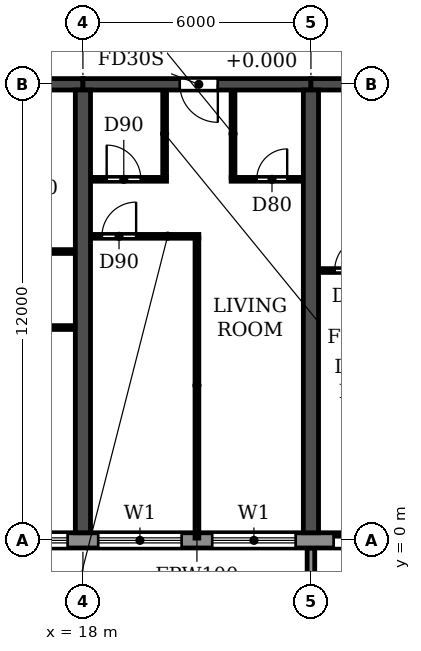
"""IFC4 building model, lengths in metres.
Left out: names, types, materials, properties, quantities, classifications, styles, units other than length and angle.
Written with IfcOpenShell. Run it as: python <this file> out.ifc"""

import sys

from ifc_helpers import new_model, si_unit, direction, frame, frame_2d, origin, place, context, subcontext, project, spatial, polyline, rectangle, outline, extrude, source, transform, mapped, element, fill, save


model = new_model("IFC4")
c1 = context("Model", 3, precision=1e-05, world=origin(), true_north=direction((0.0, 1.0)))
c2 = subcontext(c1, "Body", "Model", "MODEL_VIEW")
j1 = project(units=[si_unit("LENGTHUNIT", "METRE"), si_unit("PLANEANGLEUNIT", "RADIAN")], contexts=[c1])
p1 = place(None, origin())
s1 = spatial("IfcSite", under=j1, at=p1, CompositionType="ELEMENT")
p2 = place(p1, origin())
s2 = spatial("IfcBuilding", under=s1, at=p2, CompositionType="ELEMENT")
p3 = place(p2, frame((0.0, 0.0, 26.7)))
s3 = spatial("IfcBuildingStorey", under=s2, at=p3, CompositionType="ELEMENT", Elevation=26.7)
for number, where, z_axis, x_axis in (
    (1, (18.0, 0.2, 0.0), (0.0, 0.0, 1.0), (0.0, 1.0, 0.0)),
    (2, (24.0, 0.2, 0.0), (0.0, 0.0, 1.0), (0.0, 1.0, 0.0)),
):
    element("IfcWall", number, at=place(p3, frame(where, z_axis=z_axis, x_axis=x_axis)), inside=s3, PredefinedType="SHEAR", context=c2, shape_type="SweptSolid", body=[
        extrude(rectangle(XDim=11.65, YDim=0.4, at=frame_2d((5.825, 0.0))), origin(), (0.0, 0.0, 1.0), 3.05),
    ])
p4 = place(p3, frame((12.0, 12.0, 0.0), z_axis=(0.0, 0.0, 1.0), x_axis=(1.0, 0.0, 0.0)))
e3 = element("IfcWall", 3, at=p4, inside=s3, PredefinedType="SHEAR", context=c2, shape_type="SweptSolid", body=[
    extrude(rectangle(XDim=6.0, YDim=0.3, at=frame_2d((3.0, 0.0))), origin(), (0.0, 0.0, 1.0), 2.45),
])
p5 = place(p3, frame((18.0, 12.0, 0.0), z_axis=(0.0, 0.0, 1.0), x_axis=(1.0, 0.0, 0.0)))
e4 = element("IfcWall", 4, at=p5, inside=s3, PredefinedType="SHEAR", context=c2, shape_type="SweptSolid", body=[
    extrude(rectangle(XDim=6.0, YDim=0.3, at=frame_2d((3.0, 0.0))), origin(), (0.0, 0.0, 1.0), 2.45),
])
p6 = place(p5, frame((2.55, 0.0, 0.0)))
e5 = element("IfcOpeningElement", 5, at=p6, cuts=e4, PredefinedType="OPENING", context=c2, shape_type="SweptSolid", body=[
    extrude(rectangle(XDim=1.0, YDim=2.1, at=frame_2d((0.5, 1.05))), frame((0.0, 0.16, 0.0), z_axis=(0.0, -1.0, 0.0), x_axis=(1.0, 0.0, 0.0)), (0.0, 0.0, 1.0), 0.32),
])
p7 = place(p3, frame((24.0, 12.0, 0.0), z_axis=(0.0, 0.0, 1.0), x_axis=(1.0, 0.0, 0.0)))
e6 = element("IfcWall", 6, at=p7, inside=s3, PredefinedType="SHEAR", context=c2, shape_type="SweptSolid", body=[
    extrude(rectangle(XDim=6.0, YDim=0.3, at=frame_2d((3.0, 0.0))), origin(), (0.0, 0.0, 1.0), 2.45),
])
p8 = place(p7, frame((2.55, 0.0, 0.0)))
e7 = element("IfcOpeningElement", 7, at=p8, cuts=e6, PredefinedType="OPENING", context=c2, shape_type="SweptSolid", body=[
    extrude(rectangle(XDim=1.0, YDim=2.1, at=frame_2d((0.5, 1.05))), frame((0.0, 0.16, 0.0), z_axis=(0.0, -1.0, 0.0), x_axis=(1.0, 0.0, 0.0)), (0.0, 0.0, 1.0), 0.32),
])
p9 = place(p3, frame((4.683, 0.0, 0.0), z_axis=(0.0, 0.0, 1.0), x_axis=(1.0, 0.0, 0.0)))
e8 = element("IfcWall", 8, at=p9, inside=s3, PredefinedType="STANDARD", context=c2, shape_type="SweptSolid", body=[
    extrude(rectangle(XDim=92.634, YDim=0.4, at=frame_2d((46.317, 0.0))), origin(), (0.0, 0.0, 1.0), 3.05),
])
p10 = place(p9, frame((1.717, 0.0, 0.9)))
e9 = element("IfcOpeningElement", 9, at=p10, cuts=e8, PredefinedType="OPENING", context=c2, shape_type="SweptSolid", body=[
    extrude(rectangle(XDim=2.2, YDim=1.5, at=frame_2d((1.1, 0.75))), frame((0.0, 0.21, 0.0), z_axis=(0.0, -1.0, 0.0), x_axis=(1.0, 0.0, 0.0)), (0.0, 0.0, 1.0), 0.42),
])
p11 = place(p9, frame((4.717, 0.0, 0.9)))
e10 = element("IfcOpeningElement", 10, at=p11, cuts=e8, PredefinedType="OPENING", context=c2, shape_type="SweptSolid", body=[
    extrude(rectangle(XDim=2.2, YDim=1.5, at=frame_2d((1.1, 0.75))), frame((0.0, 0.21, 0.0), z_axis=(0.0, -1.0, 0.0), x_axis=(1.0, 0.0, 0.0)), (0.0, 0.0, 1.0), 0.42),
])
p12 = place(p9, frame((7.717, 0.0, 0.9)))
e11 = element("IfcOpeningElement", 11, at=p12, cuts=e8, PredefinedType="OPENING", context=c2, shape_type="SweptSolid", body=[
    extrude(rectangle(XDim=2.2, YDim=1.5, at=frame_2d((1.1, 0.75))), frame((0.0, 0.21, 0.0), z_axis=(0.0, -1.0, 0.0), x_axis=(1.0, 0.0, 0.0)), (0.0, 0.0, 1.0), 0.42),
])
p13 = place(p9, frame((10.717, 0.0, 0.9)))
e12 = element("IfcOpeningElement", 12, at=p13, cuts=e8, PredefinedType="OPENING", context=c2, shape_type="SweptSolid", body=[
    extrude(rectangle(XDim=2.2, YDim=1.5, at=frame_2d((1.1, 0.75))), frame((0.0, 0.21, 0.0), z_axis=(0.0, -1.0, 0.0), x_axis=(1.0, 0.0, 0.0)), (0.0, 0.0, 1.0), 0.42),
])
p14 = place(p9, frame((13.717, 0.0, 0.9)))
e13 = element("IfcOpeningElement", 13, at=p14, cuts=e8, PredefinedType="OPENING", context=c2, shape_type="SweptSolid", body=[
    extrude(rectangle(XDim=2.2, YDim=1.5, at=frame_2d((1.1, 0.75))), frame((0.0, 0.21, 0.0), z_axis=(0.0, -1.0, 0.0), x_axis=(1.0, 0.0, 0.0)), (0.0, 0.0, 1.0), 0.42),
])
p15 = place(p9, frame((16.717, 0.0, 0.9)))
e14 = element("IfcOpeningElement", 14, at=p15, cuts=e8, PredefinedType="OPENING", context=c2, shape_type="SweptSolid", body=[
    extrude(rectangle(XDim=2.2, YDim=1.5, at=frame_2d((1.1, 0.75))), frame((0.0, 0.21, 0.0), z_axis=(0.0, -1.0, 0.0), x_axis=(1.0, 0.0, 0.0)), (0.0, 0.0, 1.0), 0.42),
])
p16 = place(p9, frame((19.917, 0.0, 0.0)))
e15 = element("IfcOpeningElement", 15, at=p16, cuts=e8, PredefinedType="OPENING", context=c2, shape_type="SweptSolid", body=[
    extrude(rectangle(XDim=1.8, YDim=2.4, at=frame_2d((0.9, 1.2))), frame((0.0, 0.21, 0.0), z_axis=(0.0, -1.0, 0.0), x_axis=(1.0, 0.0, 0.0)), (0.0, 0.0, 1.0), 0.42),
])
p17 = place(p9, frame((22.717, 0.0, 0.9)))
e16 = element("IfcOpeningElement", 16, at=p17, cuts=e8, PredefinedType="OPENING", context=c2, shape_type="SweptSolid", body=[
    extrude(rectangle(XDim=2.2, YDim=1.5, at=frame_2d((1.1, 0.75))), frame((0.0, 0.21, 0.0), z_axis=(0.0, -1.0, 0.0), x_axis=(1.0, 0.0, 0.0)), (0.0, 0.0, 1.0), 0.42),
])
p18 = place(p9, frame((25.717, 0.0, 0.9)))
e17 = element("IfcOpeningElement", 17, at=p18, cuts=e8, PredefinedType="OPENING", context=c2, shape_type="SweptSolid", body=[
    extrude(rectangle(XDim=2.2, YDim=1.5, at=frame_2d((1.1, 0.75))), frame((0.0, 0.21, 0.0), z_axis=(0.0, -1.0, 0.0), x_axis=(1.0, 0.0, 0.0)), (0.0, 0.0, 1.0), 0.42),
])
p19 = place(p9, frame((28.717, 0.0, 0.9)))
e18 = element("IfcOpeningElement", 18, at=p19, cuts=e8, PredefinedType="OPENING", context=c2, shape_type="SweptSolid", body=[
    extrude(rectangle(XDim=2.2, YDim=1.5, at=frame_2d((1.1, 0.75))), frame((0.0, 0.21, 0.0), z_axis=(0.0, -1.0, 0.0), x_axis=(1.0, 0.0, 0.0)), (0.0, 0.0, 1.0), 0.42),
])
p20 = place(p9, frame((31.917, 0.0, 0.0)))
e19 = element("IfcOpeningElement", 19, at=p20, cuts=e8, PredefinedType="OPENING", context=c2, shape_type="SweptSolid", body=[
    extrude(rectangle(XDim=1.8, YDim=2.4, at=frame_2d((0.9, 1.2))), frame((0.0, 0.21, 0.0), z_axis=(0.0, -1.0, 0.0), x_axis=(1.0, 0.0, 0.0)), (0.0, 0.0, 1.0), 0.42),
])
p21 = place(p9, frame((34.717, 0.0, 0.9)))
e20 = element("IfcOpeningElement", 20, at=p21, cuts=e8, PredefinedType="OPENING", context=c2, shape_type="SweptSolid", body=[
    extrude(rectangle(XDim=2.2, YDim=1.5, at=frame_2d((1.1, 0.75))), frame((0.0, 0.21, 0.0), z_axis=(0.0, -1.0, 0.0), x_axis=(1.0, 0.0, 0.0)), (0.0, 0.0, 1.0), 0.42),
])
p22 = place(p9, frame((37.717, 0.0, 0.9)))
e21 = element("IfcOpeningElement", 21, at=p22, cuts=e8, PredefinedType="OPENING", context=c2, shape_type="SweptSolid", body=[
    extrude(rectangle(XDim=2.2, YDim=1.5, at=frame_2d((1.1, 0.75))), frame((0.0, 0.21, 0.0), z_axis=(0.0, -1.0, 0.0), x_axis=(1.0, 0.0, 0.0)), (0.0, 0.0, 1.0), 0.42),
])
p23 = place(p9, frame((40.717, 0.0, 0.9)))
e22 = element("IfcOpeningElement", 22, at=p23, cuts=e8, PredefinedType="OPENING", context=c2, shape_type="SweptSolid", body=[
    extrude(rectangle(XDim=2.2, YDim=1.5, at=frame_2d((1.1, 0.75))), frame((0.0, 0.21, 0.0), z_axis=(0.0, -1.0, 0.0), x_axis=(1.0, 0.0, 0.0)), (0.0, 0.0, 1.0), 0.42),
])
p24 = place(p9, frame((43.917, 0.0, 0.0)))
e23 = element("IfcOpeningElement", 23, at=p24, cuts=e8, PredefinedType="OPENING", context=c2, shape_type="SweptSolid", body=[
    extrude(rectangle(XDim=1.8, YDim=2.4, at=frame_2d((0.9, 1.2))), frame((0.0, 0.21, 0.0), z_axis=(0.0, -1.0, 0.0), x_axis=(1.0, 0.0, 0.0)), (0.0, 0.0, 1.0), 0.42),
])
p25 = place(p9, frame((46.717, 0.0, 0.9)))
e24 = element("IfcOpeningElement", 24, at=p25, cuts=e8, PredefinedType="OPENING", context=c2, shape_type="SweptSolid", body=[
    extrude(rectangle(XDim=2.2, YDim=1.5, at=frame_2d((1.1, 0.75))), frame((0.0, 0.21, 0.0), z_axis=(0.0, -1.0, 0.0), x_axis=(1.0, 0.0, 0.0)), (0.0, 0.0, 1.0), 0.42),
])
p26 = place(p9, frame((49.717, 0.0, 0.9)))
e25 = element("IfcOpeningElement", 25, at=p26, cuts=e8, PredefinedType="OPENING", context=c2, shape_type="SweptSolid", body=[
    extrude(rectangle(XDim=2.2, YDim=1.5, at=frame_2d((1.1, 0.75))), frame((0.0, 0.21, 0.0), z_axis=(0.0, -1.0, 0.0), x_axis=(1.0, 0.0, 0.0)), (0.0, 0.0, 1.0), 0.42),
])
p27 = place(p9, frame((52.717, 0.0, 0.9)))
e26 = element("IfcOpeningElement", 26, at=p27, cuts=e8, PredefinedType="OPENING", context=c2, shape_type="SweptSolid", body=[
    extrude(rectangle(XDim=2.2, YDim=1.5, at=frame_2d((1.1, 0.75))), frame((0.0, 0.21, 0.0), z_axis=(0.0, -1.0, 0.0), x_axis=(1.0, 0.0, 0.0)), (0.0, 0.0, 1.0), 0.42),
])
p28 = place(p9, frame((55.717, 0.0, 0.9)))
e27 = element("IfcOpeningElement", 27, at=p28, cuts=e8, PredefinedType="OPENING", context=c2, shape_type="SweptSolid", body=[
    extrude(rectangle(XDim=2.2, YDim=1.5, at=frame_2d((1.1, 0.75))), frame((0.0, 0.21, 0.0), z_axis=(0.0, -1.0, 0.0), x_axis=(1.0, 0.0, 0.0)), (0.0, 0.0, 1.0), 0.42),
])
p29 = place(p9, frame((58.917, 0.0, 0.0)))
e28 = element("IfcOpeningElement", 28, at=p29, cuts=e8, PredefinedType="OPENING", context=c2, shape_type="SweptSolid", body=[
    extrude(rectangle(XDim=1.8, YDim=2.4, at=frame_2d((0.9, 1.2))), frame((0.0, 0.21, 0.0), z_axis=(0.0, -1.0, 0.0), x_axis=(1.0, 0.0, 0.0)), (0.0, 0.0, 1.0), 0.42),
])
p30 = place(p9, frame((61.717, 0.0, 0.9)))
e29 = element("IfcOpeningElement", 29, at=p30, cuts=e8, PredefinedType="OPENING", context=c2, shape_type="SweptSolid", body=[
    extrude(rectangle(XDim=2.2, YDim=1.5, at=frame_2d((1.1, 0.75))), frame((0.0, 0.21, 0.0), z_axis=(0.0, -1.0, 0.0), x_axis=(1.0, 0.0, 0.0)), (0.0, 0.0, 1.0), 0.42),
])
p31 = place(p9, frame((64.717, 0.0, 0.9)))
e30 = element("IfcOpeningElement", 30, at=p31, cuts=e8, PredefinedType="OPENING", context=c2, shape_type="SweptSolid", body=[
    extrude(rectangle(XDim=2.2, YDim=1.5, at=frame_2d((1.1, 0.75))), frame((0.0, 0.21, 0.0), z_axis=(0.0, -1.0, 0.0), x_axis=(1.0, 0.0, 0.0)), (0.0, 0.0, 1.0), 0.42),
])
p32 = place(p9, frame((67.717, 0.0, 0.9)))
e31 = element("IfcOpeningElement", 31, at=p32, cuts=e8, PredefinedType="OPENING", context=c2, shape_type="SweptSolid", body=[
    extrude(rectangle(XDim=2.2, YDim=1.5, at=frame_2d((1.1, 0.75))), frame((0.0, 0.21, 0.0), z_axis=(0.0, -1.0, 0.0), x_axis=(1.0, 0.0, 0.0)), (0.0, 0.0, 1.0), 0.42),
])
p33 = place(p9, frame((70.917, 0.0, 0.0)))
e32 = element("IfcOpeningElement", 32, at=p33, cuts=e8, PredefinedType="OPENING", context=c2, shape_type="SweptSolid", body=[
    extrude(rectangle(XDim=1.8, YDim=2.4, at=frame_2d((0.9, 1.2))), frame((0.0, 0.21, 0.0), z_axis=(0.0, -1.0, 0.0), x_axis=(1.0, 0.0, 0.0)), (0.0, 0.0, 1.0), 0.42),
])
p34 = place(p9, frame((73.717, 0.0, 0.9)))
e33 = element("IfcOpeningElement", 33, at=p34, cuts=e8, PredefinedType="OPENING", context=c2, shape_type="SweptSolid", body=[
    extrude(rectangle(XDim=2.2, YDim=1.5, at=frame_2d((1.1, 0.75))), frame((0.0, 0.21, 0.0), z_axis=(0.0, -1.0, 0.0), x_axis=(1.0, 0.0, 0.0)), (0.0, 0.0, 1.0), 0.42),
])
p35 = place(p9, frame((76.717, 0.0, 0.9)))
e34 = element("IfcOpeningElement", 34, at=p35, cuts=e8, PredefinedType="OPENING", context=c2, shape_type="SweptSolid", body=[
    extrude(rectangle(XDim=2.2, YDim=1.5, at=frame_2d((1.1, 0.75))), frame((0.0, 0.21, 0.0), z_axis=(0.0, -1.0, 0.0), x_axis=(1.0, 0.0, 0.0)), (0.0, 0.0, 1.0), 0.42),
])
p36 = place(p9, frame((79.717, 0.0, 0.9)))
e35 = element("IfcOpeningElement", 35, at=p36, cuts=e8, PredefinedType="OPENING", context=c2, shape_type="SweptSolid", body=[
    extrude(rectangle(XDim=2.2, YDim=1.5, at=frame_2d((1.1, 0.75))), frame((0.0, 0.21, 0.0), z_axis=(0.0, -1.0, 0.0), x_axis=(1.0, 0.0, 0.0)), (0.0, 0.0, 1.0), 0.42),
])
p37 = place(p9, frame((82.717, 0.0, 0.9)))
e36 = element("IfcOpeningElement", 36, at=p37, cuts=e8, PredefinedType="OPENING", context=c2, shape_type="SweptSolid", body=[
    extrude(rectangle(XDim=2.2, YDim=1.5, at=frame_2d((1.1, 0.75))), frame((0.0, 0.21, 0.0), z_axis=(0.0, -1.0, 0.0), x_axis=(1.0, 0.0, 0.0)), (0.0, 0.0, 1.0), 0.42),
])
p38 = place(p9, frame((85.717, 0.0, 0.9)))
e37 = element("IfcOpeningElement", 37, at=p38, cuts=e8, PredefinedType="OPENING", context=c2, shape_type="SweptSolid", body=[
    extrude(rectangle(XDim=2.2, YDim=1.5, at=frame_2d((1.1, 0.75))), frame((0.0, 0.21, 0.0), z_axis=(0.0, -1.0, 0.0), x_axis=(1.0, 0.0, 0.0)), (0.0, 0.0, 1.0), 0.42),
])
p39 = place(p9, frame((88.717, 0.0, 0.9)))
e38 = element("IfcOpeningElement", 38, at=p39, cuts=e8, PredefinedType="OPENING", context=c2, shape_type="SweptSolid", body=[
    extrude(rectangle(XDim=2.2, YDim=1.5, at=frame_2d((1.1, 0.75))), frame((0.0, 0.21, 0.0), z_axis=(0.0, -1.0, 0.0), x_axis=(1.0, 0.0, 0.0)), (0.0, 0.0, 1.0), 0.42),
])
m1 = source(origin(), c2, "Body", "SweptSolid", [
    extrude(outline(polyline([(0.0, 0.0), (0.2, 0.0), (0.2, 1.65), (0.0, 1.65), (0.0, 0.0)])), origin(), (0.0, 0.0, 1.0), 3.1),
])
p40 = place(p3, frame((23.9, -1.85, 0.0)))
e39 = element("IfcWall", 39, at=p40, inside=s3, PredefinedType="STANDARD", context=c2, shape_type="MappedRepresentation", body=[
    mapped(m1, transform((0.0, 0.0, 0.0))),
])
p41 = place(p3, frame((12.21, 5.6, 0.0), z_axis=(0.0, 0.0, 1.0), x_axis=(1.0, 0.0, 0.0)))
e40 = element("IfcWall", 40, at=p41, inside=s3, PredefinedType="PARTITIONING", context=c2, shape_type="SweptSolid", body=[
    extrude(rectangle(XDim=5.58, YDim=0.1, at=frame_2d((2.79, 0.0))), origin(), (0.0, 0.0, 1.0), 3.05),
])
p42 = place(p41, frame((1.39, 0.0, 0.0)))
e41 = element("IfcOpeningElement", 41, at=p42, cuts=e40, PredefinedType="OPENING", context=c2, shape_type="SweptSolid", body=[
    extrude(rectangle(XDim=0.9, YDim=2.1, at=frame_2d((0.45, 1.05))), frame((0.0, 0.06, 0.0), z_axis=(0.0, -1.0, 0.0), x_axis=(1.0, 0.0, 0.0)), (0.0, 0.0, 1.0), 0.12),
])
p43 = place(p41, frame((3.29, 0.0, 0.0)))
e42 = element("IfcOpeningElement", 42, at=p43, cuts=e40, PredefinedType="OPENING", context=c2, shape_type="SweptSolid", body=[
    extrude(rectangle(XDim=0.9, YDim=2.1, at=frame_2d((0.45, 1.05))), frame((0.0, 0.06, 0.0), z_axis=(0.0, -1.0, 0.0), x_axis=(1.0, 0.0, 0.0)), (0.0, 0.0, 1.0), 0.12),
])
p44 = place(p3, frame((24.21, 7.1, 0.0), z_axis=(0.0, 0.0, 1.0), x_axis=(1.0, 0.0, 0.0)))
e43 = element("IfcWall", 43, at=p44, inside=s3, PredefinedType="PARTITIONING", context=c2, shape_type="SweptSolid", body=[
    extrude(rectangle(XDim=1.99, YDim=0.1, at=frame_2d((0.995, 0.0))), origin(), (0.0, 0.0, 1.0), 3.05),
])
p45 = place(p44, frame((0.415, 0.0, 0.0)))
e44 = element("IfcOpeningElement", 44, at=p45, cuts=e43, PredefinedType="OPENING", context=c2, shape_type="SweptSolid", body=[
    extrude(rectangle(XDim=0.9, YDim=2.1, at=frame_2d((0.45, 1.05))), frame((0.0, 0.06, 0.0), z_axis=(0.0, -1.0, 0.0), x_axis=(1.0, 0.0, 0.0)), (0.0, 0.0, 1.0), 0.12),
])
p46 = place(p3, frame((14.65, 7.6, 0.0), z_axis=(0.0, 0.0, 1.0), x_axis=(1.0, 0.0, 0.0)))
e45 = element("IfcWall", 45, at=p46, inside=s3, PredefinedType="PARTITIONING", context=c2, shape_type="SweptSolid", body=[
    extrude(rectangle(XDim=3.14, YDim=0.1, at=frame_2d((1.57, 0.0))), origin(), (0.0, 0.0, 1.0), 3.05),
])
p47 = place(p46, frame((1.3, 0.0, 0.0)))
e46 = element("IfcOpeningElement", 46, at=p47, cuts=e45, PredefinedType="OPENING", context=c2, shape_type="SweptSolid", body=[
    extrude(rectangle(XDim=0.8, YDim=2.1, at=frame_2d((0.4, 1.05))), frame((0.0, 0.06, 0.0), z_axis=(0.0, -1.0, 0.0), x_axis=(1.0, 0.0, 0.0)), (0.0, 0.0, 1.0), 0.12),
])
p48 = place(p3, frame((18.21, 8.0, 0.0), z_axis=(0.0, 0.0, 1.0), x_axis=(1.0, 0.0, 0.0)))
e47 = element("IfcWall", 47, at=p48, inside=s3, PredefinedType="PARTITIONING", context=c2, shape_type="SweptSolid", body=[
    extrude(rectangle(XDim=2.84, YDim=0.1, at=frame_2d((1.42, 0.0))), origin(), (0.0, 0.0, 1.0), 3.05),
])
p49 = place(p48, frame((0.29, 0.0, 0.0)))
e48 = element("IfcOpeningElement", 48, at=p49, cuts=e47, PredefinedType="OPENING", context=c2, shape_type="SweptSolid", body=[
    extrude(rectangle(XDim=0.9, YDim=2.1, at=frame_2d((0.45, 1.05))), frame((0.0, 0.06, 0.0), z_axis=(0.0, -1.0, 0.0), x_axis=(1.0, 0.0, 0.0)), (0.0, 0.0, 1.0), 0.12),
])
p50 = place(p3, frame((18.21, 9.5, 0.0), z_axis=(0.0, 0.0, 1.0), x_axis=(1.0, 0.0, 0.0)))
e49 = element("IfcWall", 49, at=p50, inside=s3, PredefinedType="PARTITIONING", context=c2, shape_type="SweptSolid", body=[
    extrude(rectangle(XDim=1.99, YDim=0.1, at=frame_2d((0.995, 0.0))), origin(), (0.0, 0.0, 1.0), 3.05),
])
p51 = place(p50, frame((0.415, 0.0, 0.0)))
e50 = element("IfcOpeningElement", 50, at=p51, cuts=e49, PredefinedType="OPENING", context=c2, shape_type="SweptSolid", body=[
    extrude(rectangle(XDim=0.9, YDim=2.1, at=frame_2d((0.45, 1.05))), frame((0.0, 0.06, 0.0), z_axis=(0.0, -1.0, 0.0), x_axis=(1.0, 0.0, 0.0)), (0.0, 0.0, 1.0), 0.12),
])
p52 = place(p3, frame((21.9, 9.5, 0.0), z_axis=(0.0, 0.0, 1.0), x_axis=(1.0, 0.0, 0.0)))
e51 = element("IfcWall", 51, at=p52, inside=s3, PredefinedType="PARTITIONING", context=c2, shape_type="SweptSolid", body=[
    extrude(rectangle(XDim=1.89, YDim=0.1, at=frame_2d((0.945, 0.0))), origin(), (0.0, 0.0, 1.0), 3.05),
])
p53 = place(p52, frame((0.675, 0.0, 0.0)))
e52 = element("IfcOpeningElement", 52, at=p53, cuts=e51, PredefinedType="OPENING", context=c2, shape_type="SweptSolid", body=[
    extrude(rectangle(XDim=0.8, YDim=2.1, at=frame_2d((0.4, 1.05))), frame((0.0, 0.06, 0.0), z_axis=(0.0, -1.0, 0.0), x_axis=(1.0, 0.0, 0.0)), (0.0, 0.0, 1.0), 0.12),
])
p54 = place(p3, frame((20.15, 9.55, 0.0), z_axis=(0.0, 0.0, 1.0), x_axis=(0.0, 1.0, 0.0)))
e53 = element("IfcWall", 53, at=p54, inside=s3, PredefinedType="PARTITIONING", context=c2, shape_type="SweptSolid", body=[
    extrude(rectangle(XDim=2.29, YDim=0.1, at=frame_2d((1.145, 0.0))), origin(), (0.0, 0.0, 1.0), 3.05),
])
p55 = place(p3, frame((21.0, 0.06, 0.0), z_axis=(0.0, 0.0, 1.0), x_axis=(0.0, 1.0, 0.0)))
e54 = element("IfcWall", 54, at=p55, inside=s3, PredefinedType="PARTITIONING", context=c2, shape_type="SweptSolid", body=[
    extrude(rectangle(XDim=7.89, YDim=0.1, at=frame_2d((3.945, 0.0))), origin(), (0.0, 0.0, 1.0), 3.05),
])
p56 = place(p3, frame((21.95, 9.55, 0.0), z_axis=(0.0, 0.0, 1.0), x_axis=(0.0, 1.0, 0.0)))
e55 = element("IfcWall", 55, at=p56, inside=s3, PredefinedType="PARTITIONING", context=c2, shape_type="SweptSolid", body=[
    extrude(rectangle(XDim=2.29, YDim=0.1, at=frame_2d((1.145, 0.0))), origin(), (0.0, 0.0, 1.0), 3.05),
])
p57 = place(p13, origin())
e56 = element("IfcWindow", 56, at=p57, inside=s3, PartitioningType="DOUBLE_PANEL_HORIZONTAL", PredefinedType="WINDOW", context=c2, shape_type="SweptSolid", body=[
    extrude(rectangle(XDim=2.2, YDim=1.5, at=frame_2d((1.1, 0.75))), frame((0.0, 0.03, 0.0), z_axis=(0.0, -1.0, 0.0), x_axis=(1.0, 0.0, 0.0)), (0.0, 0.0, 1.0), 0.06),
])
fill(e12, e56)
p58 = place(p14, origin())
e57 = element("IfcWindow", 57, at=p58, inside=s3, PartitioningType="DOUBLE_PANEL_HORIZONTAL", PredefinedType="WINDOW", context=c2, shape_type="SweptSolid", body=[
    extrude(rectangle(XDim=2.2, YDim=1.5, at=frame_2d((1.1, 0.75))), frame((0.0, 0.03, 0.0), z_axis=(0.0, -1.0, 0.0), x_axis=(1.0, 0.0, 0.0)), (0.0, 0.0, 1.0), 0.06),
])
fill(e13, e57)
p59 = place(p15, origin())
e58 = element("IfcWindow", 58, at=p59, inside=s3, PartitioningType="DOUBLE_PANEL_HORIZONTAL", PredefinedType="WINDOW", context=c2, shape_type="SweptSolid", body=[
    extrude(rectangle(XDim=2.2, YDim=1.5, at=frame_2d((1.1, 0.75))), frame((0.0, 0.03, 0.0), z_axis=(0.0, -1.0, 0.0), x_axis=(1.0, 0.0, 0.0)), (0.0, 0.0, 1.0), 0.06),
])
fill(e14, e58)
p60 = place(p16, origin())
e59 = element("IfcDoor", 59, at=p60, inside=s3, OperationType="DOUBLE_DOOR_SLIDING", PredefinedType="DOOR", context=c2, shape_type="SweptSolid", body=[
    extrude(rectangle(XDim=1.8, YDim=2.4, at=frame_2d((0.9, 1.2))), frame((0.0, 0.025, 0.0), z_axis=(0.0, -1.0, 0.0), x_axis=(1.0, 0.0, 0.0)), (0.0, 0.0, 1.0), 0.05),
])
fill(e15, e59)
p61 = place(p49, origin())
e60 = element("IfcDoor", 60, at=p61, inside=s3, OperationType="SINGLE_SWING_RIGHT", PredefinedType="DOOR", context=c2, shape_type="SweptSolid", body=[
    extrude(rectangle(XDim=0.9, YDim=2.1, at=frame_2d((0.45, 1.05))), frame((0.0, 0.025, 0.0), z_axis=(0.0, -1.0, 0.0), x_axis=(1.0, 0.0, 0.0)), (0.0, 0.0, 1.0), 0.05),
])
fill(e48, e60)
p62 = place(p51, origin())
e61 = element("IfcDoor", 61, at=p62, inside=s3, OperationType="SINGLE_SWING_LEFT", PredefinedType="DOOR", context=c2, shape_type="SweptSolid", body=[
    extrude(rectangle(XDim=0.9, YDim=2.1, at=frame_2d((0.45, 1.05))), frame((0.0, 0.025, 0.0), z_axis=(0.0, -1.0, 0.0), x_axis=(1.0, 0.0, 0.0)), (0.0, 0.0, 1.0), 0.05),
])
fill(e50, e61)
p63 = place(p6, frame((1.0, 0.0, 0.0), z_axis=(0.0, 0.0, 1.0), x_axis=(-1.0, 0.0, 0.0)))
e62 = element("IfcDoor", 62, at=p63, inside=s3, OperationType="SINGLE_SWING_LEFT", PredefinedType="DOOR", context=c2, shape_type="SweptSolid", body=[
    extrude(rectangle(XDim=1.0, YDim=2.1, at=frame_2d((0.5, 1.05))), frame((0.0, 0.025, 0.0), z_axis=(0.0, -1.0, 0.0), x_axis=(1.0, 0.0, 0.0)), (0.0, 0.0, 1.0), 0.05),
])
fill(e5, e62)
p64 = place(p53, origin())
e63 = element("IfcDoor", 63, at=p64, inside=s3, OperationType="SINGLE_SWING_RIGHT", PredefinedType="DOOR", context=c2, shape_type="SweptSolid", body=[
    extrude(rectangle(XDim=0.8, YDim=2.1, at=frame_2d((0.4, 1.05))), frame((0.0, 0.025, 0.0), z_axis=(0.0, -1.0, 0.0), x_axis=(1.0, 0.0, 0.0)), (0.0, 0.0, 1.0), 0.05),
])
fill(e52, e63)
p65 = place(p45, origin())
e64 = element("IfcDoor", 64, at=p65, inside=s3, OperationType="SINGLE_SWING_RIGHT", PredefinedType="DOOR", context=c2, shape_type="SweptSolid", body=[
    extrude(rectangle(XDim=0.9, YDim=2.1, at=frame_2d((0.45, 1.05))), frame((0.0, 0.025, 0.0), z_axis=(0.0, -1.0, 0.0), x_axis=(1.0, 0.0, 0.0)), (0.0, 0.0, 1.0), 0.05),
])
fill(e44, e64)
save(model, sys.argv[1])
